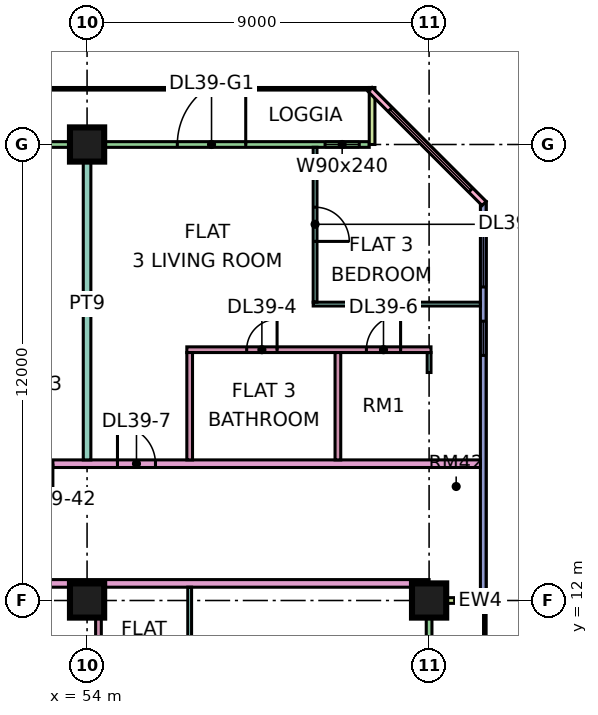
"""IFC4 building model, lengths in metres.
Left out: names, types, materials, properties, quantities, classifications, styles, units other than length and angle.
Written with IfcOpenShell. Run it as: python <this file> out.ifc"""

import sys

from ifc_helpers import new_model, si_unit, direction, frame, frame_2d, origin, origin_2d, place, context, subcontext, project, spatial, rectangle, extrude, element, fill, save


model = new_model("IFC4")
c1 = context("Model", 3, precision=1e-05, world=origin(), true_north=direction((0.0, 1.0)))
c2 = subcontext(c1, "Body", "Model", "MODEL_VIEW")
j1 = project(units=[si_unit("LENGTHUNIT", "METRE"), si_unit("PLANEANGLEUNIT", "RADIAN")], contexts=[c1])
p1 = place(None, origin())
s1 = spatial("IfcSite", under=j1, at=p1, CompositionType="ELEMENT")
p2 = place(p1, origin())
s2 = spatial("IfcBuilding", under=s1, at=p2, CompositionType="ELEMENT")
p3 = place(p2, frame((0.0, 0.0, 172.4)))
s3 = spatial("IfcBuildingStorey", under=s2, at=p3, CompositionType="ELEMENT", Elevation=172.4)
for number, where, z_axis, x_axis in (
    (1, (54.0, 12.0, 0.0), (0.0, 0.0, 1.0), (1.0, 0.0, 0.0)),
    (2, (54.0, 24.0, 0.0), (0.0, 0.0, 1.0), (1.0, 0.0, 0.0)),
    (3, (63.0, 12.0, 0.0), (0.0, 0.0, 1.0), (1.0, 0.0, 0.0)),
):
    element("IfcColumn", number, at=place(p3, frame(where, z_axis=z_axis, x_axis=x_axis)), inside=s3, PredefinedType="COLUMN", context=c2, shape_type="SweptSolid", body=[
        extrude(rectangle(XDim=0.9, YDim=0.9, at=origin_2d()), origin(), (0.0, 0.0, 1.0), 3.75),
    ])
p4 = place(p3, frame((61.425, 24.0, 0.0), z_axis=(0.0, 0.0, 1.0), x_axis=(-1.0, 0.0, 0.0)))
e4 = element("IfcWall", 4, at=p4, inside=s3, PredefinedType="SOLIDWALL", context=c2, shape_type="SweptSolid", body=[
    extrude(rectangle(XDim=13.35, YDim=0.15, at=frame_2d((6.675, 0.0))), origin(), (0.0, 0.0, 1.0), 3.35),
])
p5 = place(p4, frame((0.262, 0.0, 0.45)))
e5 = element("IfcOpeningElement", 5, at=p5, cuts=e4, PredefinedType="OPENING", context=c2, shape_type="SweptSolid", body=[
    extrude(rectangle(XDim=0.9, YDim=2.4, at=frame_2d((0.45, 1.2))), frame((0.0, 0.085, 0.0), z_axis=(0.0, -1.0, 0.0), x_axis=(1.0, 0.0, 0.0)), (0.0, 0.0, 1.0), 0.17),
])
p6 = place(p4, frame((3.25, 0.0, 0.0)))
e6 = element("IfcOpeningElement", 6, at=p6, cuts=e4, PredefinedType="OPENING", context=c2, shape_type="SweptSolid", body=[
    extrude(rectangle(XDim=1.8, YDim=2.4, at=frame_2d((0.9, 1.2))), frame((0.0, 0.085, 0.0), z_axis=(0.0, -1.0, 0.0), x_axis=(1.0, 0.0, 0.0)), (0.0, 0.0, 1.0), 0.17),
])
p7 = place(p4, frame((8.562, 0.0, 0.45)))
e7 = element("IfcOpeningElement", 7, at=p7, cuts=e4, PredefinedType="OPENING", context=c2, shape_type="SweptSolid", body=[
    extrude(rectangle(XDim=4.2, YDim=2.4, at=frame_2d((2.1, 1.2))), frame((0.0, 0.085, 0.0), z_axis=(0.0, -1.0, 0.0), x_axis=(1.0, 0.0, 0.0)), (0.0, 0.0, 1.0), 0.17),
])
p8 = place(p3, frame((61.5, 25.5, 0.0), z_axis=(0.0, 0.0, 1.0), x_axis=(0.0, -1.0, 0.0)))
e8 = element("IfcWall", 8, at=p8, inside=s3, PredefinedType="SOLIDWALL", context=c2, shape_type="SweptSolid", body=[
    extrude(rectangle(XDim=1.5, YDim=0.15, at=frame_2d((0.75, 0.0))), origin(), (0.0, 0.0, 1.0), 3.35),
])
p9 = place(p3, frame((63.0, 1.575, 0.0), z_axis=(0.0, 0.0, 1.0), x_axis=(0.0, 1.0, 0.0)))
e9 = element("IfcWall", 9, at=p9, inside=s3, PredefinedType="SOLIDWALL", context=c2, shape_type="SweptSolid", body=[
    extrude(rectangle(XDim=10.35, YDim=0.15, at=frame_2d((5.175, 0.0))), origin(), (0.0, 0.0, 1.0), 3.35),
])
p10 = place(p9, frame((2.137, 0.0, 0.0)))
e10 = element("IfcOpeningElement", 10, at=p10, cuts=e9, PredefinedType="OPENING", context=c2, shape_type="SweptSolid", body=[
    extrude(rectangle(XDim=1.8, YDim=2.4, at=frame_2d((0.9, 1.2))), frame((0.0, 0.085, 0.0), z_axis=(0.0, -1.0, 0.0), x_axis=(1.0, 0.0, 0.0)), (0.0, 0.0, 1.0), 0.17),
])
p11 = place(p9, frame((6.475, 0.0, 0.45)))
e11 = element("IfcOpeningElement", 11, at=p11, cuts=e9, PredefinedType="OPENING", context=c2, shape_type="SweptSolid", body=[
    extrude(rectangle(XDim=3.0, YDim=2.4, at=frame_2d((1.5, 1.2))), frame((0.0, 0.085, 0.0), z_axis=(0.0, -1.0, 0.0), x_axis=(1.0, 0.0, 0.0)), (0.0, 0.0, 1.0), 0.17),
])
p12 = place(p3, frame((64.5, 12.0, 0.0), z_axis=(0.0, 0.0, 1.0), x_axis=(-1.0, 0.0, 0.0)))
e12 = element("IfcWall", 12, at=p12, inside=s3, PredefinedType="SOLIDWALL", context=c2, shape_type="SweptSolid", body=[
    extrude(rectangle(XDim=1.5, YDim=0.15, at=frame_2d((0.75, 0.0))), origin(), (0.0, 0.0, 1.0), 3.35),
])
p13 = place(p3, frame((64.425, 12.075, 0.0), z_axis=(0.0, 0.0, 1.0), x_axis=(0.0, 1.0, 0.0)))
e13 = element("IfcWall", 13, at=p13, inside=s3, PredefinedType="SOLIDWALL", context=c2, shape_type="SweptSolid", body=[
    extrude(rectangle(XDim=10.425, YDim=0.15, at=frame_2d((5.212, 0.0))), origin(), (0.0, 0.0, 1.0), 3.35),
])
p14 = place(p13, frame((6.375, 0.0, 0.45)))
e14 = element("IfcOpeningElement", 14, at=p14, cuts=e13, PredefinedType="OPENING", context=c2, shape_type="SweptSolid", body=[
    extrude(rectangle(XDim=0.9, YDim=2.4, at=frame_2d((0.45, 1.2))), frame((0.0, 0.085, 0.0), z_axis=(0.0, -1.0, 0.0), x_axis=(1.0, 0.0, 0.0)), (0.0, 0.0, 1.0), 0.17),
])
p15 = place(p13, frame((8.175, 0.0, 0.45)))
e15 = element("IfcOpeningElement", 15, at=p15, cuts=e13, PredefinedType="OPENING", context=c2, shape_type="SweptSolid", body=[
    extrude(rectangle(XDim=1.8, YDim=2.4, at=frame_2d((0.9, 1.2))), frame((0.0, 0.085, 0.0), z_axis=(0.0, -1.0, 0.0), x_axis=(1.0, 0.0, 0.0)), (0.0, 0.0, 1.0), 0.17),
])
p16 = place(p3, frame((64.447, 22.447, 0.0), z_axis=(0.0, 0.0, 1.0), x_axis=(-0.707106781187, 0.707106781187, 0.0)))
e16 = element("IfcWall", 16, at=p16, inside=s3, PredefinedType="SOLIDWALL", context=c2, shape_type="SweptSolid", body=[
    extrude(rectangle(XDim=4.243, YDim=0.15, at=frame_2d((2.121, 0.0))), origin(), (0.0, 0.0, 1.0), 3.35),
])
p17 = place(p16, frame((0.498, 0.0, 0.45)))
e17 = element("IfcOpeningElement", 17, at=p17, cuts=e16, PredefinedType="OPENING", context=c2, shape_type="SweptSolid", body=[
    extrude(rectangle(XDim=3.0, YDim=2.4, at=frame_2d((1.5, 1.2))), frame((0.0, 0.085, 0.0), z_axis=(0.0, -1.0, 0.0), x_axis=(1.0, 0.0, 0.0)), (0.0, 0.0, 1.0), 0.17),
])
p18 = place(p3, frame((40.65, 12.45, 0.0), z_axis=(0.0, 0.0, 1.0), x_axis=(1.0, 0.0, 0.0)))
e18 = element("IfcWall", 18, at=p18, inside=s3, PredefinedType="PARTITIONING", context=c2, shape_type="SweptSolid", body=[
    extrude(rectangle(XDim=22.35, YDim=0.2, at=frame_2d((11.175, 0.0))), origin(), (0.0, 0.0, 1.0), 3.35),
])
p19 = place(p18, frame((8.25, 0.0, 0.0)))
e19 = element("IfcOpeningElement", 19, at=p19, cuts=e18, PredefinedType="OPENING", context=c2, shape_type="SweptSolid", body=[
    extrude(rectangle(XDim=1.0, YDim=2.1, at=frame_2d((0.5, 1.05))), frame((0.0, 0.11, 0.0), z_axis=(0.0, -1.0, 0.0), x_axis=(1.0, 0.0, 0.0)), (0.0, 0.0, 1.0), 0.22),
])
p20 = place(p18, frame((1.05, 0.0, 0.0)))
e20 = element("IfcOpeningElement", 20, at=p20, cuts=e18, PredefinedType="OPENING", context=c2, shape_type="SweptSolid", body=[
    extrude(rectangle(XDim=1.0, YDim=2.1, at=frame_2d((0.5, 1.05))), frame((0.0, 0.11, 0.0), z_axis=(0.0, -1.0, 0.0), x_axis=(1.0, 0.0, 0.0)), (0.0, 0.0, 1.0), 0.22),
])
p21 = place(p3, frame((51.225, 15.6, 0.0), z_axis=(0.0, 0.0, 1.0), x_axis=(1.0, 0.0, 0.0)))
e21 = element("IfcWall", 21, at=p21, inside=s3, PredefinedType="PARTITIONING", context=c2, shape_type="SweptSolid", body=[
    extrude(rectangle(XDim=13.125, YDim=0.2, at=frame_2d((6.562, 0.0))), origin(), (0.0, 0.0, 1.0), 3.35),
])
p22 = place(p21, frame((3.575, 0.0, 0.0)))
e22 = element("IfcOpeningElement", 22, at=p22, cuts=e21, PredefinedType="OPENING", context=c2, shape_type="SweptSolid", body=[
    extrude(rectangle(XDim=1.0, YDim=2.1, at=frame_2d((0.5, 1.05))), frame((0.0, 0.11, 0.0), z_axis=(0.0, -1.0, 0.0), x_axis=(1.0, 0.0, 0.0)), (0.0, 0.0, 1.0), 0.22),
])
p23 = place(p21, frame((0.875, 0.0, 0.0)))
e23 = element("IfcOpeningElement", 23, at=p23, cuts=e21, PredefinedType="OPENING", context=c2, shape_type="SweptSolid", body=[
    extrude(rectangle(XDim=1.0, YDim=2.1, at=frame_2d((0.5, 1.05))), frame((0.0, 0.11, 0.0), z_axis=(0.0, -1.0, 0.0), x_axis=(1.0, 0.0, 0.0)), (0.0, 0.0, 1.0), 0.22),
])
p24 = place(p3, frame((54.0, 15.7, 0.0), z_axis=(0.0, 0.0, 1.0), x_axis=(0.0, 1.0, 0.0)))
e24 = element("IfcWall", 24, at=p24, inside=s3, PredefinedType="PARTITIONING", context=c2, shape_type="SweptSolid", body=[
    extrude(rectangle(XDim=8.226, YDim=0.2, at=frame_2d((4.113, 0.0))), origin(), (0.0, 0.0, 1.0), 3.35),
])
p25 = place(p3, frame((54.3, 7.725, 0.0), z_axis=(0.0, 0.0, 1.0), x_axis=(0.0, 1.0, 0.0)))
e25 = element("IfcWall", 25, at=p25, inside=s3, PredefinedType="PARTITIONING", context=c2, shape_type="SweptSolid", body=[
    extrude(rectangle(XDim=4.625, YDim=0.15, at=frame_2d((2.312, 0.0))), origin(), (0.0, 0.0, 1.0), 3.35),
])
p26 = place(p3, frame((56.625, 18.6, 0.0), z_axis=(0.0, 0.0, 1.0), x_axis=(1.0, 0.0, 0.0)))
e26 = element("IfcWall", 26, at=p26, inside=s3, PredefinedType="PARTITIONING", context=c2, shape_type="SweptSolid", body=[
    extrude(rectangle(XDim=6.425, YDim=0.15, at=frame_2d((3.212, 0.0))), origin(), (0.0, 0.0, 1.0), 3.35),
])
p27 = place(p26, frame((1.575, 0.0, 0.0)))
e27 = element("IfcOpeningElement", 27, at=p27, cuts=e26, PredefinedType="OPENING", context=c2, shape_type="SweptSolid", body=[
    extrude(rectangle(XDim=0.8, YDim=2.1, at=frame_2d((0.4, 1.05))), frame((0.0, 0.085, 0.0), z_axis=(0.0, -1.0, 0.0), x_axis=(1.0, 0.0, 0.0)), (0.0, 0.0, 1.0), 0.17),
])
p28 = place(p26, frame((4.725, 0.0, 0.0)))
e28 = element("IfcOpeningElement", 28, at=p28, cuts=e26, PredefinedType="OPENING", context=c2, shape_type="SweptSolid", body=[
    extrude(rectangle(XDim=0.9, YDim=2.1, at=frame_2d((0.45, 1.05))), frame((0.0, 0.085, 0.0), z_axis=(0.0, -1.0, 0.0), x_axis=(1.0, 0.0, 0.0)), (0.0, 0.0, 1.0), 0.17),
])
p29 = place(p3, frame((56.7, 7.725, 0.0), z_axis=(0.0, 0.0, 1.0), x_axis=(0.0, 1.0, 0.0)))
e29 = element("IfcWall", 29, at=p29, inside=s3, PredefinedType="PARTITIONING", context=c2, shape_type="SweptSolid", body=[
    extrude(rectangle(XDim=4.625, YDim=0.1, at=frame_2d((2.312, 0.0))), origin(), (0.0, 0.0, 1.0), 3.35),
])
p30 = place(p3, frame((56.7, 15.7, 0.0), z_axis=(0.0, 0.0, 1.0), x_axis=(0.0, 1.0, 0.0)))
e30 = element("IfcWall", 30, at=p30, inside=s3, PredefinedType="PARTITIONING", context=c2, shape_type="SweptSolid", body=[
    extrude(rectangle(XDim=2.825, YDim=0.15, at=frame_2d((1.413, 0.0))), origin(), (0.0, 0.0, 1.0), 3.35),
])
p31 = place(p3, frame((59.95, 19.8, 0.0), z_axis=(0.0, 0.0, 1.0), x_axis=(1.0, 0.0, 0.0)))
e31 = element("IfcWall", 31, at=p31, inside=s3, PredefinedType="PARTITIONING", context=c2, shape_type="SweptSolid", body=[
    extrude(rectangle(XDim=4.401, YDim=0.1, at=frame_2d((2.201, 0.0))), origin(), (0.0, 0.0, 1.0), 3.35),
])
p32 = place(p3, frame((60.0, 19.85, 0.0), z_axis=(0.0, 0.0, 1.0), x_axis=(0.0, 1.0, 0.0)))
e32 = element("IfcWall", 32, at=p32, inside=s3, PredefinedType="PARTITIONING", context=c2, shape_type="SweptSolid", body=[
    extrude(rectangle(XDim=4.076, YDim=0.1, at=frame_2d((2.038, 0.0))), origin(), (0.0, 0.0, 1.0), 3.35),
])
p33 = place(p32, frame((1.6, 0.0, 0.0)))
e33 = element("IfcOpeningElement", 33, at=p33, cuts=e32, PredefinedType="OPENING", context=c2, shape_type="SweptSolid", body=[
    extrude(rectangle(XDim=0.9, YDim=2.1, at=frame_2d((0.45, 1.05))), frame((0.0, 0.06, 0.0), z_axis=(0.0, -1.0, 0.0), x_axis=(1.0, 0.0, 0.0)), (0.0, 0.0, 1.0), 0.12),
])
p34 = place(p3, frame((60.6, 15.7, 0.0), z_axis=(0.0, 0.0, 1.0), x_axis=(0.0, 1.0, 0.0)))
e34 = element("IfcWall", 34, at=p34, inside=s3, PredefinedType="PARTITIONING", context=c2, shape_type="SweptSolid", body=[
    extrude(rectangle(XDim=2.825, YDim=0.15, at=frame_2d((1.413, 0.0))), origin(), (0.0, 0.0, 1.0), 3.35),
])
p35 = place(p3, frame((63.0, 18.0, 0.0), z_axis=(0.0, 0.0, 1.0), x_axis=(0.0, 1.0, 0.0)))
e35 = element("IfcWall", 35, at=p35, inside=s3, PredefinedType="PARTITIONING", context=c2, shape_type="SweptSolid", body=[
    extrude(rectangle(XDim=0.525, YDim=0.1, at=frame_2d((0.262, 0.0))), origin(), (0.0, 0.0, 1.0), 3.35),
])
p36 = place(p5, origin())
e36 = element("IfcWindow", 36, at=p36, inside=s3, PartitioningType="SINGLE_PANEL", PredefinedType="WINDOW", context=c2, shape_type="SweptSolid", body=[
    extrude(rectangle(XDim=0.9, YDim=2.4, at=frame_2d((0.45, 1.2))), frame((0.0, 0.03, 0.0), z_axis=(0.0, -1.0, 0.0), x_axis=(1.0, 0.0, 0.0)), (0.0, 0.0, 1.0), 0.06),
])
fill(e5, e36)
p37 = place(p6, frame((1.8, 0.0, 0.0), z_axis=(0.0, 0.0, 1.0), x_axis=(-1.0, 0.0, 0.0)))
e37 = element("IfcDoor", 37, at=p37, inside=s3, OperationType="DOUBLE_DOOR_SINGLE_SWING", PredefinedType="DOOR", context=c2, shape_type="SweptSolid", body=[
    extrude(rectangle(XDim=1.8, YDim=2.4, at=frame_2d((0.9, 1.2))), frame((0.0, 0.025, 0.0), z_axis=(0.0, -1.0, 0.0), x_axis=(1.0, 0.0, 0.0)), (0.0, 0.0, 1.0), 0.05),
])
fill(e6, e37)
p38 = place(p14, origin())
e38 = element("IfcWindow", 38, at=p38, inside=s3, PartitioningType="SINGLE_PANEL", PredefinedType="WINDOW", context=c2, shape_type="SweptSolid", body=[
    extrude(rectangle(XDim=0.9, YDim=2.4, at=frame_2d((0.45, 1.2))), frame((0.0, 0.03, 0.0), z_axis=(0.0, -1.0, 0.0), x_axis=(1.0, 0.0, 0.0)), (0.0, 0.0, 1.0), 0.06),
])
fill(e14, e38)
p39 = place(p15, origin())
e39 = element("IfcWindow", 39, at=p39, inside=s3, PartitioningType="SINGLE_PANEL", PredefinedType="WINDOW", context=c2, shape_type="SweptSolid", body=[
    extrude(rectangle(XDim=1.8, YDim=2.4, at=frame_2d((0.9, 1.2))), frame((0.0, 0.03, 0.0), z_axis=(0.0, -1.0, 0.0), x_axis=(1.0, 0.0, 0.0)), (0.0, 0.0, 1.0), 0.06),
])
fill(e15, e39)
p40 = place(p17, origin())
e40 = element("IfcWindow", 40, at=p40, inside=s3, PartitioningType="SINGLE_PANEL", PredefinedType="WINDOW", context=c2, shape_type="SweptSolid", body=[
    extrude(rectangle(XDim=3.0, YDim=2.4, at=frame_2d((1.5, 1.2))), frame((0.0, 0.03, 0.0), z_axis=(0.0, -1.0, 0.0), x_axis=(1.0, 0.0, 0.0)), (0.0, 0.0, 1.0), 0.06),
])
fill(e17, e40)
p41 = place(p27, frame((0.8, 0.0, 0.0), z_axis=(0.0, 0.0, 1.0), x_axis=(-1.0, 0.0, 0.0)))
e41 = element("IfcDoor", 41, at=p41, inside=s3, OperationType="SINGLE_SWING_RIGHT", PredefinedType="DOOR", context=c2, shape_type="SweptSolid", body=[
    extrude(rectangle(XDim=0.8, YDim=2.1, at=frame_2d((0.4, 1.05))), frame((0.0, 0.025, 0.0), z_axis=(0.0, -1.0, 0.0), x_axis=(1.0, 0.0, 0.0)), (0.0, 0.0, 1.0), 0.05),
])
fill(e27, e41)
p42 = place(p33, frame((0.9, 0.0, 0.0), z_axis=(0.0, 0.0, 1.0), x_axis=(-1.0, 0.0, 0.0)))
e42 = element("IfcDoor", 42, at=p42, inside=s3, OperationType="SINGLE_SWING_LEFT", PredefinedType="DOOR", context=c2, shape_type="SweptSolid", body=[
    extrude(rectangle(XDim=0.9, YDim=2.1, at=frame_2d((0.45, 1.05))), frame((0.0, 0.025, 0.0), z_axis=(0.0, -1.0, 0.0), x_axis=(1.0, 0.0, 0.0)), (0.0, 0.0, 1.0), 0.05),
])
fill(e33, e42)
p43 = place(p28, frame((0.9, 0.0, 0.0), z_axis=(0.0, 0.0, 1.0), x_axis=(-1.0, 0.0, 0.0)))
e43 = element("IfcDoor", 43, at=p43, inside=s3, OperationType="SINGLE_SWING_RIGHT", PredefinedType="DOOR", context=c2, shape_type="SweptSolid", body=[
    extrude(rectangle(XDim=0.9, YDim=2.1, at=frame_2d((0.45, 1.05))), frame((0.0, 0.025, 0.0), z_axis=(0.0, -1.0, 0.0), x_axis=(1.0, 0.0, 0.0)), (0.0, 0.0, 1.0), 0.05),
])
fill(e28, e43)
p44 = place(p22, origin())
e44 = element("IfcDoor", 44, at=p44, inside=s3, OperationType="SINGLE_SWING_LEFT", PredefinedType="DOOR", context=c2, shape_type="SweptSolid", body=[
    extrude(rectangle(XDim=1.0, YDim=2.1, at=frame_2d((0.5, 1.05))), frame((0.0, 0.025, 0.0), z_axis=(0.0, -1.0, 0.0), x_axis=(1.0, 0.0, 0.0)), (0.0, 0.0, 1.0), 0.05),
])
fill(e22, e44)
p45 = place(p23, origin())
e45 = element("IfcDoor", 45, at=p45, inside=s3, OperationType="SINGLE_SWING_RIGHT", PredefinedType="DOOR", context=c2, shape_type="SweptSolid", body=[
    extrude(rectangle(XDim=1.0, YDim=2.1, at=frame_2d((0.5, 1.05))), frame((0.0, 0.025, 0.0), z_axis=(0.0, -1.0, 0.0), x_axis=(1.0, 0.0, 0.0)), (0.0, 0.0, 1.0), 0.05),
])
fill(e23, e45)
save(model, sys.argv[1])
